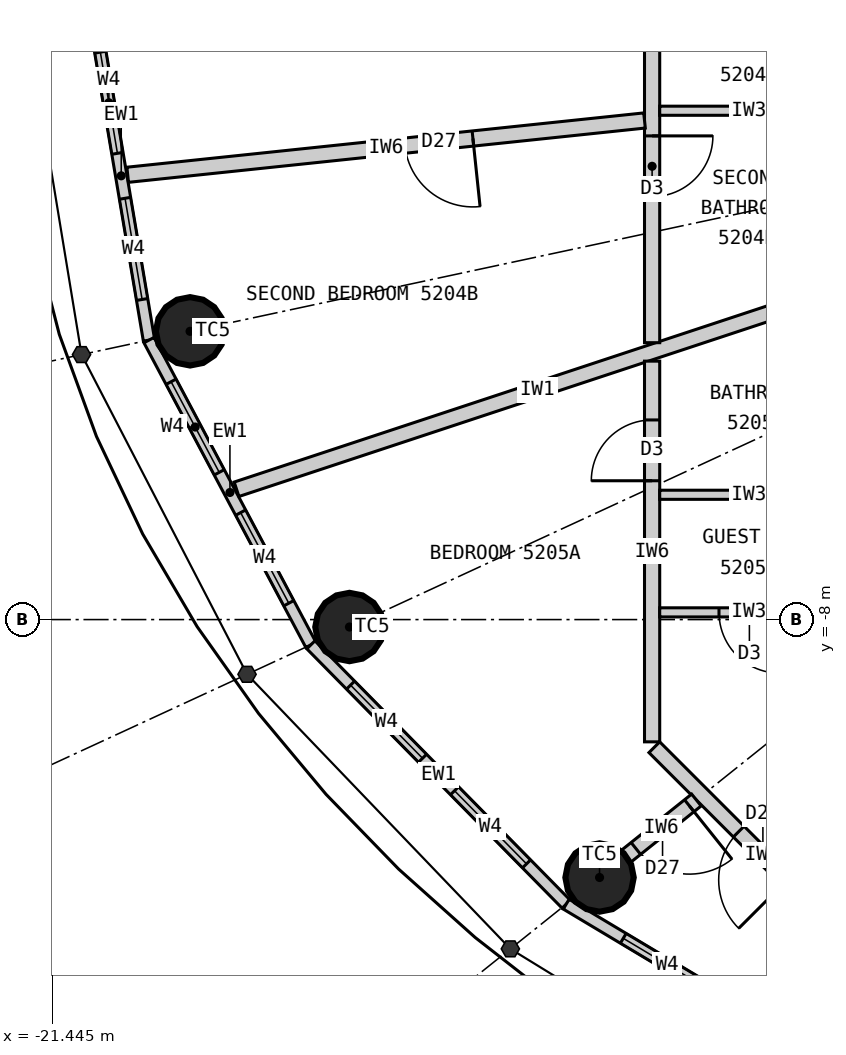
"""IFC4 building model, lengths in metres.
Left out: names, types, materials, properties, quantities, classifications, styles, units other than length and angle.
Written with IfcOpenShell. Run it as: python <this file> out.ifc"""

import sys

from ifc_helpers import new_model, si_unit, direction, frame, frame_2d, origin, origin_2d, place, context, subcontext, project, spatial, rectangle, circle, extrude, element, fill, save


model = new_model("IFC4")
c1 = context("Model", 3, precision=1e-05, world=origin(), true_north=direction((0.0, 1.0)))
c2 = subcontext(c1, "Body", "Model", "MODEL_VIEW")
j1 = project(units=[si_unit("LENGTHUNIT", "METRE"), si_unit("PLANEANGLEUNIT", "RADIAN")], contexts=[c1])
p1 = place(None, origin())
s1 = spatial("IfcSite", under=j1, at=p1, CompositionType="ELEMENT")
p2 = place(p1, origin())
s2 = spatial("IfcBuilding", under=s1, at=p2, CompositionType="ELEMENT")
p3 = place(p2, frame((0.0, 0.0, 196.2)))
s3 = spatial("IfcBuildingStorey", under=s2, at=p3, CompositionType="ELEMENT", Elevation=196.2)
for number, where, z_axis, x_axis in (
    (1, (-19.629, -4.208, 0.0), (0.0, 0.0, 1.0), (1.0, 0.0, 0.0)),
    (2, (-17.532, -8.098, 0.0), (0.0, 0.0, 1.0), (1.0, 0.0, 0.0)),
    (3, (-14.241, -11.393, 0.0), (0.0, 0.0, 1.0), (1.0, 0.0, 0.0)),
):
    element("IfcColumn", number, at=place(p3, frame(where, z_axis=z_axis, x_axis=x_axis)), inside=s3, PredefinedType="COLUMN", context=c2, shape_type="SweptSolid", body=[
        extrude(circle(Radius=0.45, at=origin_2d()), origin(), (0.0, 0.0, 1.0), 3.3),
    ])
p4 = place(p3, frame((-20.9, 0.0, 0.0), z_axis=(0.0, 0.0, 1.0), x_axis=(0.166538513568, -0.986034950445, 0.0)))
e4 = element("IfcWall", 4, at=p4, inside=s3, PredefinedType="ELEMENTEDWALL", context=c2, shape_type="SweptSolid", body=[
    extrude(rectangle(XDim=4.385, YDim=0.15, at=frame_2d((2.192, 0.0))), origin(), (0.0, 0.0, 1.0), 3.12),
])
p5 = place(p4, frame((0.542, 0.0, 0.9)))
e5 = element("IfcOpeningElement", 5, at=p5, cuts=e4, PredefinedType="OPENING", context=c2, shape_type="SweptSolid", body=[
    extrude(rectangle(XDim=1.35, YDim=1.9, at=frame_2d((0.675, 0.95))), frame((0.0, 0.085, 0.0), z_axis=(0.0, -1.0, 0.0), x_axis=(1.0, 0.0, 0.0)), (0.0, 0.0, 1.0), 0.17),
])
p6 = place(p4, frame((2.492, 0.0, 0.9)))
e6 = element("IfcOpeningElement", 6, at=p6, cuts=e4, PredefinedType="OPENING", context=c2, shape_type="SweptSolid", body=[
    extrude(rectangle(XDim=1.35, YDim=1.9, at=frame_2d((0.675, 0.95))), frame((0.0, 0.085, 0.0), z_axis=(0.0, -1.0, 0.0), x_axis=(1.0, 0.0, 0.0)), (0.0, 0.0, 1.0), 0.17),
])
p7 = place(p3, frame((-20.17, -4.323, 0.0), z_axis=(0.0, 0.0, 1.0), x_axis=(0.469256152955, -0.883062094597, 0.0)))
e7 = element("IfcWall", 7, at=p7, inside=s3, PredefinedType="ELEMENTEDWALL", context=c2, shape_type="SweptSolid", body=[
    extrude(rectangle(XDim=4.539, YDim=0.15, at=frame_2d((2.27, 0.0))), origin(), (0.0, 0.0, 1.0), 3.12),
])
p8 = place(p7, frame((0.62, 0.0, 0.9)))
e8 = element("IfcOpeningElement", 8, at=p8, cuts=e7, PredefinedType="OPENING", context=c2, shape_type="SweptSolid", body=[
    extrude(rectangle(XDim=1.35, YDim=1.9, at=frame_2d((0.675, 0.95))), frame((0.0, 0.085, 0.0), z_axis=(0.0, -1.0, 0.0), x_axis=(1.0, 0.0, 0.0)), (0.0, 0.0, 1.0), 0.17),
])
p9 = place(p7, frame((2.57, 0.0, 0.9)))
e9 = element("IfcOpeningElement", 9, at=p9, cuts=e7, PredefinedType="OPENING", context=c2, shape_type="SweptSolid", body=[
    extrude(rectangle(XDim=1.35, YDim=1.9, at=frame_2d((0.675, 0.95))), frame((0.0, 0.085, 0.0), z_axis=(0.0, -1.0, 0.0), x_axis=(1.0, 0.0, 0.0)), (0.0, 0.0, 1.0), 0.17),
])
p10 = place(p3, frame((-18.04, -8.332, 0.0), z_axis=(0.0, 0.0, 1.0), x_axis=(0.701527379618, -0.712642501993, 0.0)))
e10 = element("IfcWall", 10, at=p10, inside=s3, PredefinedType="ELEMENTEDWALL", context=c2, shape_type="SweptSolid", body=[
    extrude(rectangle(XDim=4.788, YDim=0.15, at=frame_2d((2.394, 0.0))), origin(), (0.0, 0.0, 1.0), 3.12),
])
p11 = place(p10, frame((0.744, 0.0, 0.9)))
e11 = element("IfcOpeningElement", 11, at=p11, cuts=e10, PredefinedType="OPENING", context=c2, shape_type="SweptSolid", body=[
    extrude(rectangle(XDim=1.35, YDim=1.9, at=frame_2d((0.675, 0.95))), frame((0.0, 0.085, 0.0), z_axis=(0.0, -1.0, 0.0), x_axis=(1.0, 0.0, 0.0)), (0.0, 0.0, 1.0), 0.17),
])
p12 = place(p10, frame((2.694, 0.0, 0.9)))
e12 = element("IfcOpeningElement", 12, at=p12, cuts=e10, PredefinedType="OPENING", context=c2, shape_type="SweptSolid", body=[
    extrude(rectangle(XDim=1.35, YDim=1.9, at=frame_2d((0.675, 0.95))), frame((0.0, 0.085, 0.0), z_axis=(0.0, -1.0, 0.0), x_axis=(1.0, 0.0, 0.0)), (0.0, 0.0, 1.0), 0.17),
])
p13 = place(p3, frame((-14.68, -11.744, 0.0), z_axis=(0.0, 0.0, 1.0), x_axis=(0.85822150553, -0.513279502265, 0.0)))
e13 = element("IfcWall", 13, at=p13, inside=s3, PredefinedType="ELEMENTEDWALL", context=c2, shape_type="SweptSolid", body=[
    extrude(rectangle(XDim=5.05, YDim=0.15, at=frame_2d((2.525, 0.0))), origin(), (0.0, 0.0, 1.0), 3.12),
])
p14 = place(p13, frame((0.875, 0.0, 0.9)))
e14 = element("IfcOpeningElement", 14, at=p14, cuts=e13, PredefinedType="OPENING", context=c2, shape_type="SweptSolid", body=[
    extrude(rectangle(XDim=1.35, YDim=1.9, at=frame_2d((0.675, 0.95))), frame((0.0, 0.085, 0.0), z_axis=(0.0, -1.0, 0.0), x_axis=(1.0, 0.0, 0.0)), (0.0, 0.0, 1.0), 0.17),
])
p15 = place(p13, frame((2.825, 0.0, 0.9)))
e15 = element("IfcOpeningElement", 15, at=p15, cuts=e13, PredefinedType="OPENING", context=c2, shape_type="SweptSolid", body=[
    extrude(rectangle(XDim=1.35, YDim=1.9, at=frame_2d((0.675, 0.95))), frame((0.0, 0.085, 0.0), z_axis=(0.0, -1.0, 0.0), x_axis=(1.0, 0.0, 0.0)), (0.0, 0.0, 1.0), 0.17),
])
p16 = place(p3, frame((-11.1, -3.669, 0.0), z_axis=(0.0, 0.0, 1.0), x_axis=(-0.949476668397, -0.313837627079, 0.0)))
e16 = element("IfcWall", 16, at=p16, inside=s3, PredefinedType="PARTITIONING", context=c2, shape_type="SweptSolid", body=[
    extrude(rectangle(XDim=8.339, YDim=0.2, at=frame_2d((4.169, 0.0))), origin(), (0.0, 0.0, 1.0), 3.12),
])
p17 = place(p3, frame((-13.55, 8.139, 0.0), z_axis=(0.0, 0.0, 1.0), x_axis=(0.0, -1.0, 0.0)))
e17 = element("IfcWall", 17, at=p17, inside=s3, PredefinedType="PARTITIONING", context=c2, shape_type="SweptSolid", body=[
    extrude(rectangle(XDim=12.496, YDim=0.2, at=frame_2d((6.248, 0.0))), origin(), (0.0, 0.0, 1.0), 3.12),
])
p18 = place(p17, frame((2.42, 0.0, 0.0)))
e18 = element("IfcOpeningElement", 18, at=p18, cuts=e17, PredefinedType="OPENING", context=c2, shape_type="SweptSolid", body=[
    extrude(rectangle(XDim=0.8, YDim=2.1, at=frame_2d((0.4, 1.05))), frame((0.0, 0.11, 0.0), z_axis=(0.0, -1.0, 0.0), x_axis=(1.0, 0.0, 0.0)), (0.0, 0.0, 1.0), 0.22),
])
p19 = place(p17, frame((9.776, 0.0, 0.0)))
e19 = element("IfcOpeningElement", 19, at=p19, cuts=e17, PredefinedType="OPENING", context=c2, shape_type="SweptSolid", body=[
    extrude(rectangle(XDim=0.8, YDim=2.1, at=frame_2d((0.4, 1.05))), frame((0.0, 0.11, 0.0), z_axis=(0.0, -1.0, 0.0), x_axis=(1.0, 0.0, 0.0)), (0.0, 0.0, 1.0), 0.22),
])
p20 = place(p17, frame((5.82, 0.0, 0.0)))
e20 = element("IfcOpeningElement", 20, at=p20, cuts=e17, PredefinedType="OPENING", context=c2, shape_type="SweptSolid", body=[
    extrude(rectangle(XDim=0.9, YDim=2.1, at=frame_2d((0.45, 1.05))), frame((0.0, 0.11, 0.0), z_axis=(0.0, -1.0, 0.0), x_axis=(1.0, 0.0, 0.0)), (0.0, 0.0, 1.0), 0.22),
])
p21 = place(p3, frame((-13.65, -1.434, 0.0), z_axis=(0.0, 0.0, 1.0), x_axis=(-0.994526954268, -0.10448031984, 0.0)))
e21 = element("IfcWall", 21, at=p21, inside=s3, PredefinedType="PARTITIONING", context=c2, shape_type="SweptSolid", body=[
    extrude(rectangle(XDim=6.837, YDim=0.2, at=frame_2d((3.418, 0.0))), origin(), (0.0, 0.0, 1.0), 2.47),
])
p22 = place(p21, frame((2.27, 0.0, 0.0)))
e22 = element("IfcOpeningElement", 22, at=p22, cuts=e21, PredefinedType="OPENING", context=c2, shape_type="SweptSolid", body=[
    extrude(rectangle(XDim=0.9, YDim=2.1, at=frame_2d((0.45, 1.05))), frame((0.0, 0.11, 0.0), z_axis=(0.0, -1.0, 0.0), x_axis=(1.0, 0.0, 0.0)), (0.0, 0.0, 1.0), 0.22),
])
p23 = place(p3, frame((-11.1, -1.306, 0.0), z_axis=(0.0, 0.0, 1.0), x_axis=(-1.0, 0.0, 0.0)))
e23 = element("IfcWall", 23, at=p23, inside=s3, PredefinedType="PARTITIONING", context=c2, shape_type="SweptSolid", body=[
    extrude(rectangle(XDim=2.35, YDim=0.12, at=frame_2d((1.175, 0.0))), origin(), (0.0, 0.0, 1.0), 3.12),
])
p24 = place(p3, frame((-13.55, -4.6, 0.0), z_axis=(0.0, 0.0, 1.0), x_axis=(0.0, -1.0, 0.0)))
e24 = element("IfcWall", 24, at=p24, inside=s3, PredefinedType="PARTITIONING", context=c2, shape_type="SweptSolid", body=[
    extrude(rectangle(XDim=5.009, YDim=0.2, at=frame_2d((2.504, 0.0))), origin(), (0.0, 0.0, 1.0), 3.12),
])
p25 = place(p24, frame((0.774, 0.0, 0.0)))
e25 = element("IfcOpeningElement", 25, at=p25, cuts=e24, PredefinedType="OPENING", context=c2, shape_type="SweptSolid", body=[
    extrude(rectangle(XDim=0.8, YDim=2.1, at=frame_2d((0.4, 1.05))), frame((0.0, 0.11, 0.0), z_axis=(0.0, -1.0, 0.0), x_axis=(1.0, 0.0, 0.0)), (0.0, 0.0, 1.0), 0.22),
])
p26 = place(p3, frame((-13.521, -9.679, 0.0), z_axis=(0.0, 0.0, 1.0), x_axis=(0.707106781187, -0.707106781187, 0.0)))
e26 = element("IfcWall", 26, at=p26, inside=s3, PredefinedType="PARTITIONING", context=c2, shape_type="SweptSolid", body=[
    extrude(rectangle(XDim=4.019, YDim=0.2, at=frame_2d((2.009, 0.0))), origin(), (0.0, 0.0, 1.0), 3.12),
])
p27 = place(p26, frame((1.57, 0.0, 0.0)))
e27 = element("IfcOpeningElement", 27, at=p27, cuts=e26, PredefinedType="OPENING", context=c2, shape_type="SweptSolid", body=[
    extrude(rectangle(XDim=0.9, YDim=2.1, at=frame_2d((0.45, 1.05))), frame((0.0, 0.11, 0.0), z_axis=(0.0, -1.0, 0.0), x_axis=(1.0, 0.0, 0.0)), (0.0, 0.0, 1.0), 0.22),
])
p28 = place(p3, frame((-12.968, -10.374, 0.0), z_axis=(0.0, 0.0, 1.0), x_axis=(-0.780888968944, -0.624669847345, 0.0)))
e28 = element("IfcWall", 28, at=p28, inside=s3, PredefinedType="PARTITIONING", context=c2, shape_type="SweptSolid", body=[
    extrude(rectangle(XDim=1.181, YDim=0.2, at=frame_2d((0.591, 0.0))), origin(), (0.0, 0.0, 1.0), 2.42),
])
p29 = place(p28, frame((0.12, 0.0, 0.0)))
e29 = element("IfcOpeningElement", 29, at=p29, cuts=e28, PredefinedType="OPENING", context=c2, shape_type="SweptSolid", body=[
    extrude(rectangle(XDim=0.9, YDim=2.1, at=frame_2d((0.45, 1.05))), frame((0.0, 0.11, 0.0), z_axis=(0.0, -1.0, 0.0), x_axis=(1.0, 0.0, 0.0)), (0.0, 0.0, 1.0), 0.22),
])
p30 = place(p3, frame((-11.1, -6.358, 0.0), z_axis=(0.0, 0.0, 1.0), x_axis=(-1.0, 0.0, 0.0)))
e30 = element("IfcWall", 30, at=p30, inside=s3, PredefinedType="PARTITIONING", context=c2, shape_type="SweptSolid", body=[
    extrude(rectangle(XDim=2.35, YDim=0.12, at=frame_2d((1.175, 0.0))), origin(), (0.0, 0.0, 1.0), 3.12),
])
p31 = place(p3, frame((-11.1, -7.905, 0.0), z_axis=(0.0, 0.0, 1.0), x_axis=(-1.0, 0.0, 0.0)))
e31 = element("IfcWall", 31, at=p31, inside=s3, PredefinedType="PARTITIONING", context=c2, shape_type="SweptSolid", body=[
    extrude(rectangle(XDim=2.35, YDim=0.12, at=frame_2d((1.175, 0.0))), origin(), (0.0, 0.0, 1.0), 3.12),
])
p32 = place(p31, frame((0.77, 0.0, 0.0)))
e32 = element("IfcOpeningElement", 32, at=p32, cuts=e31, PredefinedType="OPENING", context=c2, shape_type="SweptSolid", body=[
    extrude(rectangle(XDim=0.8, YDim=2.1, at=frame_2d((0.4, 1.05))), frame((0.0, 0.07, 0.0), z_axis=(0.0, -1.0, 0.0), x_axis=(1.0, 0.0, 0.0)), (0.0, 0.0, 1.0), 0.14),
])
p33 = place(p5, origin())
e33 = element("IfcWindow", 33, at=p33, inside=s3, PartitioningType="SINGLE_PANEL", PredefinedType="WINDOW", context=c2, shape_type="SweptSolid", body=[
    extrude(rectangle(XDim=1.35, YDim=1.9, at=frame_2d((0.675, 0.95))), frame((0.0, 0.03, 0.0), z_axis=(0.0, -1.0, 0.0), x_axis=(1.0, 0.0, 0.0)), (0.0, 0.0, 1.0), 0.06),
])
fill(e5, e33)
p34 = place(p6, origin())
e34 = element("IfcWindow", 34, at=p34, inside=s3, PartitioningType="SINGLE_PANEL", PredefinedType="WINDOW", context=c2, shape_type="SweptSolid", body=[
    extrude(rectangle(XDim=1.35, YDim=1.9, at=frame_2d((0.675, 0.95))), frame((0.0, 0.03, 0.0), z_axis=(0.0, -1.0, 0.0), x_axis=(1.0, 0.0, 0.0)), (0.0, 0.0, 1.0), 0.06),
])
fill(e6, e34)
p35 = place(p8, origin())
e35 = element("IfcWindow", 35, at=p35, inside=s3, PartitioningType="SINGLE_PANEL", PredefinedType="WINDOW", context=c2, shape_type="SweptSolid", body=[
    extrude(rectangle(XDim=1.35, YDim=1.9, at=frame_2d((0.675, 0.95))), frame((0.0, 0.03, 0.0), z_axis=(0.0, -1.0, 0.0), x_axis=(1.0, 0.0, 0.0)), (0.0, 0.0, 1.0), 0.06),
])
fill(e8, e35)
p36 = place(p9, origin())
e36 = element("IfcWindow", 36, at=p36, inside=s3, PartitioningType="SINGLE_PANEL", PredefinedType="WINDOW", context=c2, shape_type="SweptSolid", body=[
    extrude(rectangle(XDim=1.35, YDim=1.9, at=frame_2d((0.675, 0.95))), frame((0.0, 0.03, 0.0), z_axis=(0.0, -1.0, 0.0), x_axis=(1.0, 0.0, 0.0)), (0.0, 0.0, 1.0), 0.06),
])
fill(e9, e36)
p37 = place(p11, origin())
e37 = element("IfcWindow", 37, at=p37, inside=s3, PartitioningType="SINGLE_PANEL", PredefinedType="WINDOW", context=c2, shape_type="SweptSolid", body=[
    extrude(rectangle(XDim=1.35, YDim=1.9, at=frame_2d((0.675, 0.95))), frame((0.0, 0.03, 0.0), z_axis=(0.0, -1.0, 0.0), x_axis=(1.0, 0.0, 0.0)), (0.0, 0.0, 1.0), 0.06),
])
fill(e11, e37)
p38 = place(p12, origin())
e38 = element("IfcWindow", 38, at=p38, inside=s3, PartitioningType="SINGLE_PANEL", PredefinedType="WINDOW", context=c2, shape_type="SweptSolid", body=[
    extrude(rectangle(XDim=1.35, YDim=1.9, at=frame_2d((0.675, 0.95))), frame((0.0, 0.03, 0.0), z_axis=(0.0, -1.0, 0.0), x_axis=(1.0, 0.0, 0.0)), (0.0, 0.0, 1.0), 0.06),
])
fill(e12, e38)
p39 = place(p14, origin())
e39 = element("IfcWindow", 39, at=p39, inside=s3, PartitioningType="SINGLE_PANEL", PredefinedType="WINDOW", context=c2, shape_type="SweptSolid", body=[
    extrude(rectangle(XDim=1.35, YDim=1.9, at=frame_2d((0.675, 0.95))), frame((0.0, 0.03, 0.0), z_axis=(0.0, -1.0, 0.0), x_axis=(1.0, 0.0, 0.0)), (0.0, 0.0, 1.0), 0.06),
])
fill(e14, e39)
p40 = place(p19, origin())
e40 = element("IfcDoor", 40, at=p40, inside=s3, OperationType="SINGLE_SWING_LEFT", PredefinedType="DOOR", context=c2, shape_type="SweptSolid", body=[
    extrude(rectangle(XDim=0.8, YDim=2.1, at=frame_2d((0.4, 1.05))), frame((0.0, 0.025, 0.0), z_axis=(0.0, -1.0, 0.0), x_axis=(1.0, 0.0, 0.0)), (0.0, 0.0, 1.0), 0.05),
])
fill(e19, e40)
p41 = place(p22, origin())
e41 = element("IfcDoor", 41, at=p41, inside=s3, OperationType="SINGLE_SWING_LEFT", PredefinedType="DOOR", context=c2, shape_type="SweptSolid", body=[
    extrude(rectangle(XDim=0.9, YDim=2.1, at=frame_2d((0.45, 1.05))), frame((0.0, 0.025, 0.0), z_axis=(0.0, -1.0, 0.0), x_axis=(1.0, 0.0, 0.0)), (0.0, 0.0, 1.0), 0.05),
])
fill(e22, e41)
p42 = place(p25, origin())
e42 = element("IfcDoor", 42, at=p42, inside=s3, OperationType="SINGLE_SWING_RIGHT", PredefinedType="DOOR", context=c2, shape_type="SweptSolid", body=[
    extrude(rectangle(XDim=0.8, YDim=2.1, at=frame_2d((0.4, 1.05))), frame((0.0, 0.025, 0.0), z_axis=(0.0, -1.0, 0.0), x_axis=(1.0, 0.0, 0.0)), (0.0, 0.0, 1.0), 0.05),
])
fill(e25, e42)
p43 = place(p32, origin())
e43 = element("IfcDoor", 43, at=p43, inside=s3, OperationType="SINGLE_SWING_LEFT", PredefinedType="DOOR", context=c2, shape_type="SweptSolid", body=[
    extrude(rectangle(XDim=0.8, YDim=2.1, at=frame_2d((0.4, 1.05))), frame((0.0, 0.025, 0.0), z_axis=(0.0, -1.0, 0.0), x_axis=(1.0, 0.0, 0.0)), (0.0, 0.0, 1.0), 0.05),
])
fill(e32, e43)
p44 = place(p27, origin())
e44 = element("IfcDoor", 44, at=p44, inside=s3, OperationType="SINGLE_SWING_RIGHT", PredefinedType="DOOR", context=c2, shape_type="SweptSolid", body=[
    extrude(rectangle(XDim=0.9, YDim=2.1, at=frame_2d((0.45, 1.05))), frame((0.0, 0.025, 0.0), z_axis=(0.0, -1.0, 0.0), x_axis=(1.0, 0.0, 0.0)), (0.0, 0.0, 1.0), 0.05),
])
fill(e27, e44)
p45 = place(p29, origin())
e45 = element("IfcDoor", 45, at=p45, inside=s3, OperationType="SINGLE_SWING_LEFT", PredefinedType="DOOR", context=c2, shape_type="SweptSolid", body=[
    extrude(rectangle(XDim=0.9, YDim=2.1, at=frame_2d((0.45, 1.05))), frame((0.0, 0.025, 0.0), z_axis=(0.0, -1.0, 0.0), x_axis=(1.0, 0.0, 0.0)), (0.0, 0.0, 1.0), 0.05),
])
fill(e29, e45)
save(model, sys.argv[1])
